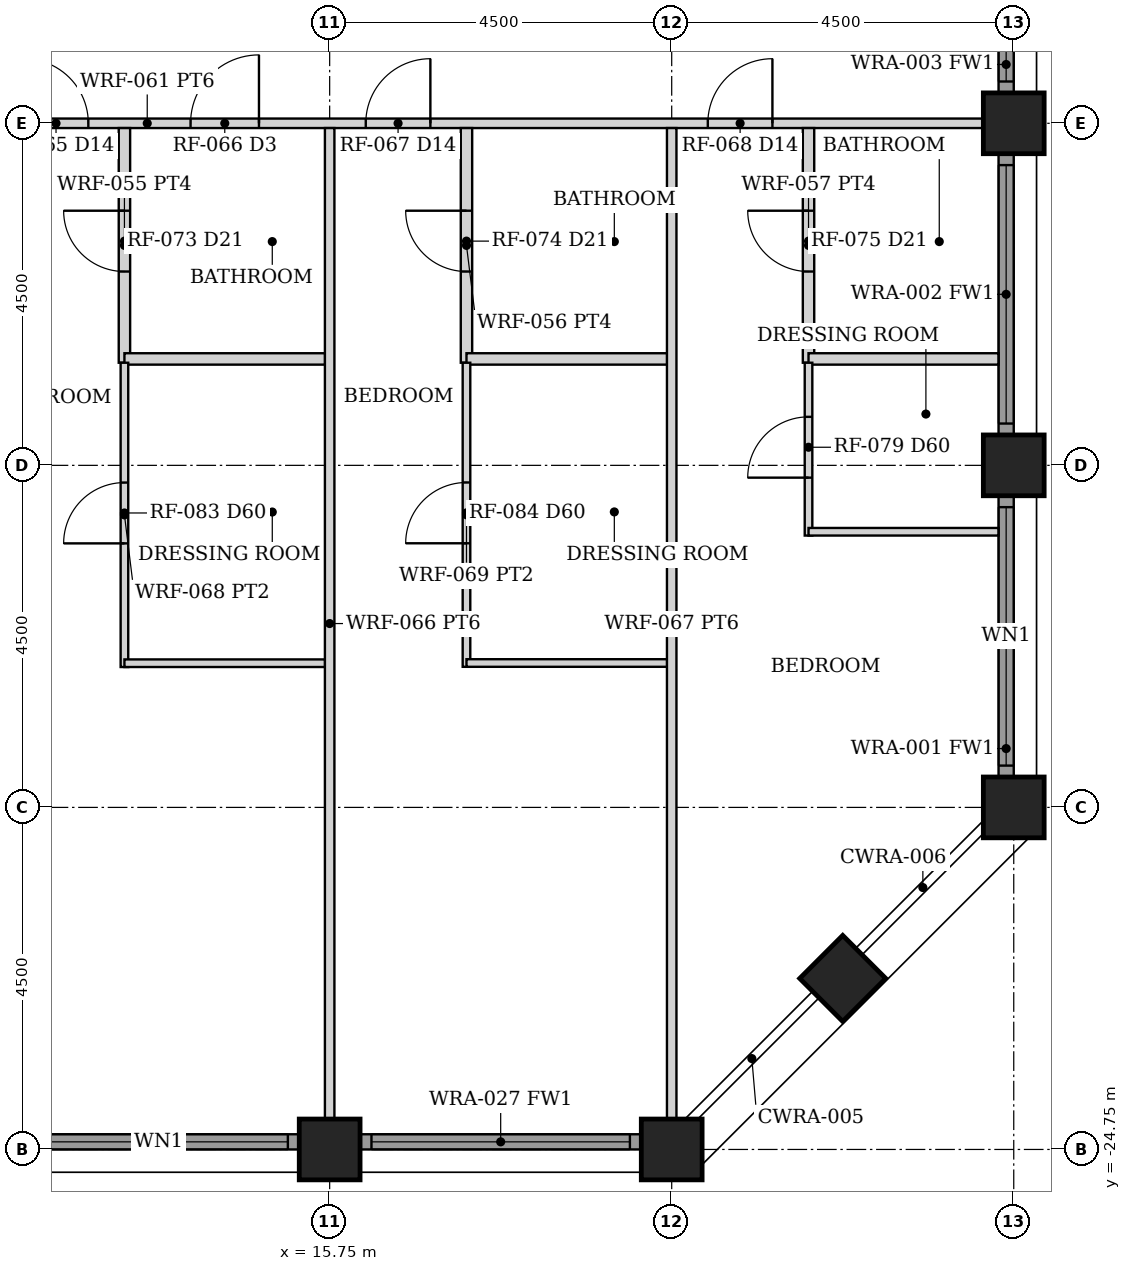
"""IFC4 building model, lengths in metres.
Left out: names, types, materials, properties, quantities, classifications, styles, units other than length and angle.
Written with IfcOpenShell. Run it as: python <this file> out.ifc"""

import sys

from ifc_helpers import new_model, si_unit, direction, frame, frame_2d, origin, origin_2d, place, context, subcontext, project, spatial, rectangle, hollow_rectangle, extrude, element, fill, save


model = new_model("IFC4")
c1 = context("Model", 3, precision=1e-05, world=origin(), true_north=direction((0.0, 1.0)))
c2 = subcontext(c1, "Body", "Model", "MODEL_VIEW")
j1 = project(units=[si_unit("LENGTHUNIT", "METRE"), si_unit("PLANEANGLEUNIT", "RADIAN")], contexts=[c1])
p1 = place(None, origin())
s1 = spatial("IfcSite", under=j1, at=p1, CompositionType="ELEMENT")
p2 = place(p1, origin())
s2 = spatial("IfcBuilding", under=s1, at=p2, CompositionType="ELEMENT")
p3 = place(p2, frame((0.0, 0.0, 79.0)))
s3 = spatial("IfcBuildingStorey", under=s2, at=p3, CompositionType="ELEMENT", Elevation=79.0)
for number, where, z_axis, x_axis in (
    (1, (24.75, -20.25, 0.0), (0.0, 0.0, 1.0), (1.0, 0.0, 0.0)),
    (2, (24.75, -15.75, 0.0), (0.0, 0.0, 1.0), (1.0, 0.0, 0.0)),
    (3, (24.75, -11.25, 0.0), (0.0, 0.0, 1.0), (1.0, 0.0, 0.0)),
    (4, (15.75, -24.75, 0.0), (0.0, 0.0, 1.0), (0.0, 1.0, 0.0)),
    (5, (20.25, -24.75, 0.0), (0.0, 0.0, 1.0), (0.0, 1.0, 0.0)),
    (6, (22.5, -22.5, 0.0), (0.0, 0.0, 1.0), (0.707, -0.707, 0.0)),
):
    element("IfcColumn", number, at=place(p3, frame(where, z_axis=z_axis, x_axis=x_axis)), inside=s3, PredefinedType="COLUMN", context=c2, shape_type="SweptSolid", body=[
        extrude(hollow_rectangle(XDim=0.8, YDim=0.8, WallThickness=0.06, at=origin_2d()), origin(), (0.0, 0.0, 1.0), 3.5),
    ])
p4 = place(p3, frame((11.655, -24.65, 0.0), z_axis=(0.0, 0.0, 1.0), x_axis=(1.0, 0.0, 0.0)))
e7 = element("IfcWall", 7, at=p4, inside=s3, PredefinedType="SOLIDWALL", context=c2, shape_type="SweptSolid", body=[
    extrude(rectangle(XDim=3.69, YDim=0.2, at=frame_2d((1.845, 0.0))), origin(), (0.0, 0.0, 1.0), 2.379),
])
p5 = place(p4, frame((0.145, 0.0, 0.3)))
e8 = element("IfcOpeningElement", 8, at=p5, cuts=e7, PredefinedType="OPENING", context=c2, shape_type="SweptSolid", body=[
    extrude(rectangle(XDim=3.4, YDim=1.929, at=frame_2d((1.7, 0.964))), frame((0.0, 0.11, 0.0), z_axis=(0.0, -1.0, 0.0), x_axis=(1.0, 0.0, 0.0)), (0.0, 0.0, 1.0), 0.22),
])
p6 = place(p3, frame((16.155, -24.65, 0.0), z_axis=(0.0, 0.0, 1.0), x_axis=(1.0, 0.0, 0.0)))
e9 = element("IfcWall", 9, at=p6, inside=s3, PredefinedType="SOLIDWALL", context=c2, shape_type="SweptSolid", body=[
    extrude(rectangle(XDim=3.69, YDim=0.2, at=frame_2d((1.845, 0.0))), origin(), (0.0, 0.0, 1.0), 2.379),
])
p7 = place(p6, frame((0.145, 0.0, 0.3)))
e10 = element("IfcOpeningElement", 10, at=p7, cuts=e9, PredefinedType="OPENING", context=c2, shape_type="SweptSolid", body=[
    extrude(rectangle(XDim=3.4, YDim=1.929, at=frame_2d((1.7, 0.964))), frame((0.0, 0.11, 0.0), z_axis=(0.0, -1.0, 0.0), x_axis=(1.0, 0.0, 0.0)), (0.0, 0.0, 1.0), 0.22),
])
p8 = place(p3, frame((24.65, -19.845, 0.0), z_axis=(0.0, 0.0, 1.0), x_axis=(0.0, 1.0, 0.0)))
e11 = element("IfcWall", 11, at=p8, inside=s3, PredefinedType="SOLIDWALL", context=c2, shape_type="SweptSolid", body=[
    extrude(rectangle(XDim=3.69, YDim=0.2, at=frame_2d((1.845, 0.0))), origin(), (0.0, 0.0, 1.0), 2.379),
])
p9 = place(p8, frame((0.145, 0.0, 0.3)))
e12 = element("IfcOpeningElement", 12, at=p9, cuts=e11, PredefinedType="OPENING", context=c2, shape_type="SweptSolid", body=[
    extrude(rectangle(XDim=3.4, YDim=1.929, at=frame_2d((1.7, 0.964))), frame((0.0, 0.11, 0.0), z_axis=(0.0, -1.0, 0.0), x_axis=(1.0, 0.0, 0.0)), (0.0, 0.0, 1.0), 0.22),
])
p10 = place(p3, frame((24.65, -15.345, 0.0), z_axis=(0.0, 0.0, 1.0), x_axis=(0.0, 1.0, 0.0)))
e13 = element("IfcWall", 13, at=p10, inside=s3, PredefinedType="SOLIDWALL", context=c2, shape_type="SweptSolid", body=[
    extrude(rectangle(XDim=3.69, YDim=0.2, at=frame_2d((1.845, 0.0))), origin(), (0.0, 0.0, 1.0), 2.379),
])
p11 = place(p10, frame((0.145, 0.0, 0.3)))
e14 = element("IfcOpeningElement", 14, at=p11, cuts=e13, PredefinedType="OPENING", context=c2, shape_type="SweptSolid", body=[
    extrude(rectangle(XDim=3.4, YDim=1.929, at=frame_2d((1.7, 0.964))), frame((0.0, 0.11, 0.0), z_axis=(0.0, -1.0, 0.0), x_axis=(1.0, 0.0, 0.0)), (0.0, 0.0, 1.0), 0.22),
])
p12 = place(p3, frame((24.65, -10.845, 0.0), z_axis=(0.0, 0.0, 1.0), x_axis=(0.0, 1.0, 0.0)))
e15 = element("IfcWall", 15, at=p12, inside=s3, PredefinedType="SOLIDWALL", context=c2, shape_type="SweptSolid", body=[
    extrude(rectangle(XDim=3.69, YDim=0.2, at=frame_2d((1.845, 0.0))), origin(), (0.0, 0.0, 1.0), 2.379),
])
p13 = place(p12, frame((0.145, 0.0, 0.3)))
e16 = element("IfcOpeningElement", 16, at=p13, cuts=e15, PredefinedType="OPENING", context=c2, shape_type="SweptSolid", body=[
    extrude(rectangle(XDim=3.4, YDim=1.929, at=frame_2d((1.7, 0.964))), frame((0.0, 0.11, 0.0), z_axis=(0.0, -1.0, 0.0), x_axis=(1.0, 0.0, 0.0)), (0.0, 0.0, 1.0), 0.22),
])
p14 = place(p3, frame((2.35, -11.25, 0.0), z_axis=(0.0, 0.0, 1.0), x_axis=(1.0, 0.0, 0.0)))
e17 = element("IfcWall", 17, at=p14, inside=s3, PredefinedType="PARTITIONING", context=c2, shape_type="SweptSolid", body=[
    extrude(rectangle(XDim=22.0, YDim=0.125, at=frame_2d((11.0, 0.0))), origin(), (0.0, 0.0, 1.0), 2.373),
])
p15 = place(p14, frame((0.85, 0.0, 0.0)))
e18 = element("IfcOpeningElement", 18, at=p15, cuts=e17, PredefinedType="OPENING", context=c2, shape_type="SweptSolid", body=[
    extrude(rectangle(XDim=0.9, YDim=2.1, at=frame_2d((0.45, 1.05))), frame((0.0, 0.073, 0.0), z_axis=(0.0, -1.0, 0.0), x_axis=(1.0, 0.0, 0.0)), (0.0, 0.0, 1.0), 0.145),
])
p16 = place(p14, frame((5.95, 0.0, 0.0)))
e19 = element("IfcOpeningElement", 19, at=p16, cuts=e17, PredefinedType="OPENING", context=c2, shape_type="SweptSolid", body=[
    extrude(rectangle(XDim=1.4, YDim=2.1, at=frame_2d((0.7, 1.05))), frame((0.0, 0.073, 0.0), z_axis=(0.0, -1.0, 0.0), x_axis=(1.0, 0.0, 0.0)), (0.0, 0.0, 1.0), 0.145),
])
p17 = place(p14, frame((9.375, 0.0, 0.0)))
e20 = element("IfcOpeningElement", 20, at=p17, cuts=e17, PredefinedType="OPENING", context=c2, shape_type="SweptSolid", body=[
    extrude(rectangle(XDim=0.85, YDim=2.1, at=frame_2d((0.425, 1.05))), frame((0.0, 0.073, 0.0), z_axis=(0.0, -1.0, 0.0), x_axis=(1.0, 0.0, 0.0)), (0.0, 0.0, 1.0), 0.145),
])
p18 = place(p14, frame((11.57, 0.0, 0.0)))
e21 = element("IfcOpeningElement", 21, at=p18, cuts=e17, PredefinedType="OPENING", context=c2, shape_type="SweptSolid", body=[
    extrude(rectangle(XDim=0.9, YDim=2.1, at=frame_2d((0.45, 1.05))), frame((0.0, 0.073, 0.0), z_axis=(0.0, -1.0, 0.0), x_axis=(1.0, 0.0, 0.0)), (0.0, 0.0, 1.0), 0.145),
])
p19 = place(p14, frame((13.875, 0.0, 0.0)))
e22 = element("IfcOpeningElement", 22, at=p19, cuts=e17, PredefinedType="OPENING", context=c2, shape_type="SweptSolid", body=[
    extrude(rectangle(XDim=0.85, YDim=2.1, at=frame_2d((0.425, 1.05))), frame((0.0, 0.073, 0.0), z_axis=(0.0, -1.0, 0.0), x_axis=(1.0, 0.0, 0.0)), (0.0, 0.0, 1.0), 0.145),
])
p20 = place(p14, frame((18.375, 0.0, 0.0)))
e23 = element("IfcOpeningElement", 23, at=p20, cuts=e17, PredefinedType="OPENING", context=c2, shape_type="SweptSolid", body=[
    extrude(rectangle(XDim=0.85, YDim=2.1, at=frame_2d((0.425, 1.05))), frame((0.0, 0.073, 0.0), z_axis=(0.0, -1.0, 0.0), x_axis=(1.0, 0.0, 0.0)), (0.0, 0.0, 1.0), 0.145),
])
p21 = place(p3, frame((13.05, -14.4, 0.0), z_axis=(0.0, 0.0, 1.0), x_axis=(0.0, 1.0, 0.0)))
e24 = element("IfcWall", 24, at=p21, inside=s3, PredefinedType="PARTITIONING", context=c2, shape_type="SweptSolid", body=[
    extrude(rectangle(XDim=3.087, YDim=0.15, at=frame_2d((1.544, 0.0))), origin(), (0.0, 0.0, 1.0), 2.373),
])
p22 = place(p21, frame((1.2, 0.0, 0.0)))
e25 = element("IfcOpeningElement", 25, at=p22, cuts=e24, PredefinedType="OPENING", context=c2, shape_type="SweptSolid", body=[
    extrude(rectangle(XDim=0.8, YDim=2.1, at=frame_2d((0.4, 1.05))), frame((0.0, 0.085, 0.0), z_axis=(0.0, -1.0, 0.0), x_axis=(1.0, 0.0, 0.0)), (0.0, 0.0, 1.0), 0.17),
])
p23 = place(p3, frame((13.05, -14.35, 0.0), z_axis=(0.0, 0.0, 1.0), x_axis=(1.0, 0.0, 0.0)))
e26 = element("IfcWall", 26, at=p23, inside=s3, PredefinedType="PARTITIONING", context=c2, shape_type="SweptSolid", body=[
    extrude(rectangle(XDim=2.64, YDim=0.15, at=frame_2d((1.32, 0.0))), origin(), (0.0, 0.0, 1.0), 2.373),
])
p24 = place(p3, frame((13.05, -18.403, 0.0), z_axis=(0.0, 0.0, 1.0), x_axis=(0.0, 1.0, 0.0)))
e27 = element("IfcWall", 27, at=p24, inside=s3, PredefinedType="PARTITIONING", context=c2, shape_type="SweptSolid", body=[
    extrude(rectangle(XDim=4.003, YDim=0.1, at=frame_2d((2.001, 0.0))), origin(), (0.0, 0.0, 1.0), 2.373),
])
p25 = place(p24, frame((1.627, 0.0, 0.0)))
e28 = element("IfcOpeningElement", 28, at=p25, cuts=e27, PredefinedType="OPENING", context=c2, shape_type="SweptSolid", body=[
    extrude(rectangle(XDim=0.8, YDim=2.1, at=frame_2d((0.4, 1.05))), frame((0.0, 0.06, 0.0), z_axis=(0.0, -1.0, 0.0), x_axis=(1.0, 0.0, 0.0)), (0.0, 0.0, 1.0), 0.12),
])
p26 = place(p3, frame((13.05, -18.353, 0.0), z_axis=(0.0, 0.0, 1.0), x_axis=(1.0, 0.0, 0.0)))
e29 = element("IfcWall", 29, at=p26, inside=s3, PredefinedType="PARTITIONING", context=c2, shape_type="SweptSolid", body=[
    extrude(rectangle(XDim=2.64, YDim=0.1, at=frame_2d((1.32, 0.0))), origin(), (0.0, 0.0, 1.0), 2.373),
])
p27 = place(p3, frame((15.75, -24.35, 0.0), z_axis=(0.0, 0.0, 1.0), x_axis=(0.0, 1.0, 0.0)))
e30 = element("IfcWall", 30, at=p27, inside=s3, PredefinedType="PARTITIONING", context=c2, shape_type="SweptSolid", body=[
    extrude(rectangle(XDim=13.038, YDim=0.125, at=frame_2d((6.519, 0.0))), origin(), (0.0, 0.0, 1.0), 2.373),
])
p28 = place(p3, frame((17.55, -14.4, 0.0), z_axis=(0.0, 0.0, 1.0), x_axis=(0.0, 1.0, 0.0)))
e31 = element("IfcWall", 31, at=p28, inside=s3, PredefinedType="PARTITIONING", context=c2, shape_type="SweptSolid", body=[
    extrude(rectangle(XDim=3.087, YDim=0.15, at=frame_2d((1.544, 0.0))), origin(), (0.0, 0.0, 1.0), 2.373),
])
p29 = place(p28, frame((1.2, 0.0, 0.0)))
e32 = element("IfcOpeningElement", 32, at=p29, cuts=e31, PredefinedType="OPENING", context=c2, shape_type="SweptSolid", body=[
    extrude(rectangle(XDim=0.8, YDim=2.1, at=frame_2d((0.4, 1.05))), frame((0.0, 0.085, 0.0), z_axis=(0.0, -1.0, 0.0), x_axis=(1.0, 0.0, 0.0)), (0.0, 0.0, 1.0), 0.17),
])
p30 = place(p3, frame((17.55, -14.35, 0.0), z_axis=(0.0, 0.0, 1.0), x_axis=(1.0, 0.0, 0.0)))
e33 = element("IfcWall", 33, at=p30, inside=s3, PredefinedType="PARTITIONING", context=c2, shape_type="SweptSolid", body=[
    extrude(rectangle(XDim=2.64, YDim=0.15, at=frame_2d((1.32, 0.0))), origin(), (0.0, 0.0, 1.0), 2.373),
])
p31 = place(p3, frame((17.55, -18.4, 0.0), z_axis=(0.0, 0.0, 1.0), x_axis=(0.0, 1.0, 0.0)))
e34 = element("IfcWall", 34, at=p31, inside=s3, PredefinedType="PARTITIONING", context=c2, shape_type="SweptSolid", body=[
    extrude(rectangle(XDim=4.0, YDim=0.1, at=frame_2d((2.0, 0.0))), origin(), (0.0, 0.0, 1.0), 2.373),
])
p32 = place(p31, frame((1.625, 0.0, 0.0)))
e35 = element("IfcOpeningElement", 35, at=p32, cuts=e34, PredefinedType="OPENING", context=c2, shape_type="SweptSolid", body=[
    extrude(rectangle(XDim=0.8, YDim=2.1, at=frame_2d((0.4, 1.05))), frame((0.0, 0.06, 0.0), z_axis=(0.0, -1.0, 0.0), x_axis=(1.0, 0.0, 0.0)), (0.0, 0.0, 1.0), 0.12),
])
p33 = place(p3, frame((17.55, -18.35, 0.0), z_axis=(0.0, 0.0, 1.0), x_axis=(1.0, 0.0, 0.0)))
e36 = element("IfcWall", 36, at=p33, inside=s3, PredefinedType="PARTITIONING", context=c2, shape_type="SweptSolid", body=[
    extrude(rectangle(XDim=2.64, YDim=0.1, at=frame_2d((1.32, 0.0))), origin(), (0.0, 0.0, 1.0), 2.373),
])
p34 = place(p3, frame((20.25, -24.35, 0.0), z_axis=(0.0, 0.0, 1.0), x_axis=(0.0, 1.0, 0.0)))
e37 = element("IfcWall", 37, at=p34, inside=s3, PredefinedType="PARTITIONING", context=c2, shape_type="SweptSolid", body=[
    extrude(rectangle(XDim=13.038, YDim=0.125, at=frame_2d((6.519, 0.0))), origin(), (0.0, 0.0, 1.0), 2.373),
])
p35 = place(p3, frame((22.05, -14.4, 0.0), z_axis=(0.0, 0.0, 1.0), x_axis=(0.0, 1.0, 0.0)))
e38 = element("IfcWall", 38, at=p35, inside=s3, PredefinedType="PARTITIONING", context=c2, shape_type="SweptSolid", body=[
    extrude(rectangle(XDim=3.087, YDim=0.15, at=frame_2d((1.544, 0.0))), origin(), (0.0, 0.0, 1.0), 2.373),
])
p36 = place(p35, frame((1.2, 0.0, 0.0)))
e39 = element("IfcOpeningElement", 39, at=p36, cuts=e38, PredefinedType="OPENING", context=c2, shape_type="SweptSolid", body=[
    extrude(rectangle(XDim=0.8, YDim=2.1, at=frame_2d((0.4, 1.05))), frame((0.0, 0.085, 0.0), z_axis=(0.0, -1.0, 0.0), x_axis=(1.0, 0.0, 0.0)), (0.0, 0.0, 1.0), 0.17),
])
p37 = place(p3, frame((22.05, -14.35, 0.0), z_axis=(0.0, 0.0, 1.0), x_axis=(1.0, 0.0, 0.0)))
e40 = element("IfcWall", 40, at=p37, inside=s3, PredefinedType="PARTITIONING", context=c2, shape_type="SweptSolid", body=[
    extrude(rectangle(XDim=2.5, YDim=0.15, at=frame_2d((1.25, 0.0))), origin(), (0.0, 0.0, 1.0), 2.373),
])
p38 = place(p3, frame((22.05, -16.674, 0.0), z_axis=(0.0, 0.0, 1.0), x_axis=(0.0, 1.0, 0.0)))
e41 = element("IfcWall", 41, at=p38, inside=s3, PredefinedType="PARTITIONING", context=c2, shape_type="SweptSolid", body=[
    extrude(rectangle(XDim=2.274, YDim=0.1, at=frame_2d((1.137, 0.0))), origin(), (0.0, 0.0, 1.0), 2.373),
])
p39 = place(p38, frame((0.762, 0.0, 0.0)))
e42 = element("IfcOpeningElement", 42, at=p39, cuts=e41, PredefinedType="OPENING", context=c2, shape_type="SweptSolid", body=[
    extrude(rectangle(XDim=0.8, YDim=2.1, at=frame_2d((0.4, 1.05))), frame((0.0, 0.06, 0.0), z_axis=(0.0, -1.0, 0.0), x_axis=(1.0, 0.0, 0.0)), (0.0, 0.0, 1.0), 0.12),
])
p40 = place(p3, frame((22.05, -16.624, 0.0), z_axis=(0.0, 0.0, 1.0), x_axis=(1.0, 0.0, 0.0)))
e43 = element("IfcWall", 43, at=p40, inside=s3, PredefinedType="PARTITIONING", context=c2, shape_type="SweptSolid", body=[
    extrude(rectangle(XDim=2.5, YDim=0.1, at=frame_2d((1.25, 0.0))), origin(), (0.0, 0.0, 1.0), 2.373),
])
p41 = place(p5, origin())
e44 = element("IfcWindow", 44, at=p41, inside=s3, PartitioningType="SINGLE_PANEL", PredefinedType="WINDOW", context=c2, shape_type="SweptSolid", body=[
    extrude(rectangle(XDim=3.4, YDim=1.929, at=frame_2d((1.7, 0.964))), frame((0.0, 0.03, 0.0), z_axis=(0.0, -1.0, 0.0), x_axis=(1.0, 0.0, 0.0)), (0.0, 0.0, 1.0), 0.06),
])
fill(e8, e44)
p42 = place(p7, origin())
e45 = element("IfcWindow", 45, at=p42, inside=s3, PartitioningType="SINGLE_PANEL", PredefinedType="WINDOW", context=c2, shape_type="SweptSolid", body=[
    extrude(rectangle(XDim=3.4, YDim=1.929, at=frame_2d((1.7, 0.964))), frame((0.0, 0.03, 0.0), z_axis=(0.0, -1.0, 0.0), x_axis=(1.0, 0.0, 0.0)), (0.0, 0.0, 1.0), 0.06),
])
fill(e10, e45)
p43 = place(p9, origin())
e46 = element("IfcWindow", 46, at=p43, inside=s3, PartitioningType="SINGLE_PANEL", PredefinedType="WINDOW", context=c2, shape_type="SweptSolid", body=[
    extrude(rectangle(XDim=3.4, YDim=1.929, at=frame_2d((1.7, 0.964))), frame((0.0, 0.03, 0.0), z_axis=(0.0, -1.0, 0.0), x_axis=(1.0, 0.0, 0.0)), (0.0, 0.0, 1.0), 0.06),
])
fill(e12, e46)
p44 = place(p11, origin())
e47 = element("IfcWindow", 47, at=p44, inside=s3, PartitioningType="SINGLE_PANEL", PredefinedType="WINDOW", context=c2, shape_type="SweptSolid", body=[
    extrude(rectangle(XDim=3.4, YDim=1.929, at=frame_2d((1.7, 0.964))), frame((0.0, 0.03, 0.0), z_axis=(0.0, -1.0, 0.0), x_axis=(1.0, 0.0, 0.0)), (0.0, 0.0, 1.0), 0.06),
])
fill(e14, e47)
p45 = place(p13, origin())
e48 = element("IfcWindow", 48, at=p45, inside=s3, PartitioningType="SINGLE_PANEL", PredefinedType="WINDOW", context=c2, shape_type="SweptSolid", body=[
    extrude(rectangle(XDim=3.4, YDim=1.929, at=frame_2d((1.7, 0.964))), frame((0.0, 0.03, 0.0), z_axis=(0.0, -1.0, 0.0), x_axis=(1.0, 0.0, 0.0)), (0.0, 0.0, 1.0), 0.06),
])
fill(e16, e48)
p46 = place(p17, origin())
e49 = element("IfcDoor", 49, at=p46, inside=s3, OperationType="SINGLE_SWING_LEFT", PredefinedType="DOOR", context=c2, shape_type="SweptSolid", body=[
    extrude(rectangle(XDim=0.85, YDim=2.1, at=frame_2d((0.425, 1.05))), frame((0.0, 0.025, 0.0), z_axis=(0.0, -1.0, 0.0), x_axis=(1.0, 0.0, 0.0)), (0.0, 0.0, 1.0), 0.05),
])
fill(e20, e49)
p47 = place(p22, origin())
e50 = element("IfcDoor", 50, at=p47, inside=s3, OperationType="SINGLE_SWING_RIGHT", PredefinedType="DOOR", context=c2, shape_type="SweptSolid", body=[
    extrude(rectangle(XDim=0.8, YDim=2.1, at=frame_2d((0.4, 1.05))), frame((0.0, 0.025, 0.0), z_axis=(0.0, -1.0, 0.0), x_axis=(1.0, 0.0, 0.0)), (0.0, 0.0, 1.0), 0.05),
])
fill(e25, e50)
p48 = place(p18, origin())
e51 = element("IfcDoor", 51, at=p48, inside=s3, OperationType="SINGLE_SWING_RIGHT", PredefinedType="DOOR", context=c2, shape_type="SweptSolid", body=[
    extrude(rectangle(XDim=0.9, YDim=2.1, at=frame_2d((0.45, 1.05))), frame((0.0, 0.025, 0.0), z_axis=(0.0, -1.0, 0.0), x_axis=(1.0, 0.0, 0.0)), (0.0, 0.0, 1.0), 0.05),
])
fill(e21, e51)
p49 = place(p25, origin())
e52 = element("IfcDoor", 52, at=p49, inside=s3, OperationType="SINGLE_SWING_LEFT", PredefinedType="DOOR", context=c2, shape_type="SweptSolid", body=[
    extrude(rectangle(XDim=0.8, YDim=2.1, at=frame_2d((0.4, 1.05))), frame((0.0, 0.025, 0.0), z_axis=(0.0, -1.0, 0.0), x_axis=(1.0, 0.0, 0.0)), (0.0, 0.0, 1.0), 0.05),
])
fill(e28, e52)
p50 = place(p19, origin())
e53 = element("IfcDoor", 53, at=p50, inside=s3, OperationType="SINGLE_SWING_RIGHT", PredefinedType="DOOR", context=c2, shape_type="SweptSolid", body=[
    extrude(rectangle(XDim=0.85, YDim=2.1, at=frame_2d((0.425, 1.05))), frame((0.0, 0.025, 0.0), z_axis=(0.0, -1.0, 0.0), x_axis=(1.0, 0.0, 0.0)), (0.0, 0.0, 1.0), 0.05),
])
fill(e22, e53)
p51 = place(p29, origin())
e54 = element("IfcDoor", 54, at=p51, inside=s3, OperationType="SINGLE_SWING_RIGHT", PredefinedType="DOOR", context=c2, shape_type="SweptSolid", body=[
    extrude(rectangle(XDim=0.8, YDim=2.1, at=frame_2d((0.4, 1.05))), frame((0.0, 0.025, 0.0), z_axis=(0.0, -1.0, 0.0), x_axis=(1.0, 0.0, 0.0)), (0.0, 0.0, 1.0), 0.05),
])
fill(e32, e54)
p52 = place(p32, origin())
e55 = element("IfcDoor", 55, at=p52, inside=s3, OperationType="SINGLE_SWING_LEFT", PredefinedType="DOOR", context=c2, shape_type="SweptSolid", body=[
    extrude(rectangle(XDim=0.8, YDim=2.1, at=frame_2d((0.4, 1.05))), frame((0.0, 0.025, 0.0), z_axis=(0.0, -1.0, 0.0), x_axis=(1.0, 0.0, 0.0)), (0.0, 0.0, 1.0), 0.05),
])
fill(e35, e55)
p53 = place(p20, origin())
e56 = element("IfcDoor", 56, at=p53, inside=s3, OperationType="SINGLE_SWING_RIGHT", PredefinedType="DOOR", context=c2, shape_type="SweptSolid", body=[
    extrude(rectangle(XDim=0.85, YDim=2.1, at=frame_2d((0.425, 1.05))), frame((0.0, 0.025, 0.0), z_axis=(0.0, -1.0, 0.0), x_axis=(1.0, 0.0, 0.0)), (0.0, 0.0, 1.0), 0.05),
])
fill(e23, e56)
p54 = place(p36, origin())
e57 = element("IfcDoor", 57, at=p54, inside=s3, OperationType="SINGLE_SWING_RIGHT", PredefinedType="DOOR", context=c2, shape_type="SweptSolid", body=[
    extrude(rectangle(XDim=0.8, YDim=2.1, at=frame_2d((0.4, 1.05))), frame((0.0, 0.025, 0.0), z_axis=(0.0, -1.0, 0.0), x_axis=(1.0, 0.0, 0.0)), (0.0, 0.0, 1.0), 0.05),
])
fill(e39, e57)
p55 = place(p39, origin())
e58 = element("IfcDoor", 58, at=p55, inside=s3, OperationType="SINGLE_SWING_LEFT", PredefinedType="DOOR", context=c2, shape_type="SweptSolid", body=[
    extrude(rectangle(XDim=0.8, YDim=2.1, at=frame_2d((0.4, 1.05))), frame((0.0, 0.025, 0.0), z_axis=(0.0, -1.0, 0.0), x_axis=(1.0, 0.0, 0.0)), (0.0, 0.0, 1.0), 0.05),
])
fill(e42, e58)
save(model, sys.argv[1])
